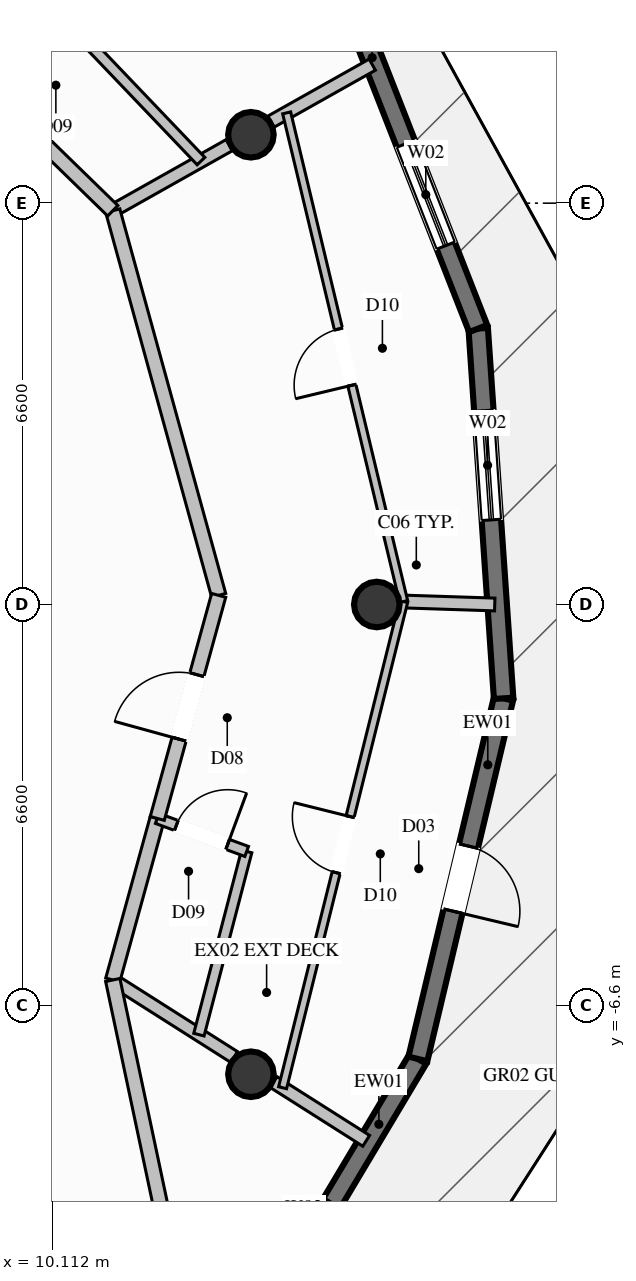
"""IFC4 building model, lengths in metres.
Left out: names, types, materials, properties, quantities, classifications, styles, units other than length and angle.
Written with IfcOpenShell. Run it as: python <this file> out.ifc"""

import sys

from ifc_helpers import new_model, si_unit, direction, frame, frame_2d, origin, origin_2d, place, context, subcontext, project, spatial, rectangle, circle, extrude, element, fill, save


model = new_model("IFC4")
c1 = context("Model", 3, precision=1e-05, world=origin(), true_north=direction((0.0, 1.0)))
c2 = subcontext(c1, "Body", "Model", "MODEL_VIEW")
j1 = project(units=[si_unit("LENGTHUNIT", "METRE"), si_unit("PLANEANGLEUNIT", "RADIAN")], contexts=[c1])
p1 = place(None, origin())
s1 = spatial("IfcSite", under=j1, at=p1, CompositionType="ELEMENT")
p2 = place(p1, origin())
s2 = spatial("IfcBuilding", under=s1, at=p2, CompositionType="ELEMENT")
p3 = place(p2, frame((0.0, 0.0, 293.4)))
s3 = spatial("IfcBuildingStorey", under=s2, at=p3, CompositionType="ELEMENT", Elevation=293.4)
for number, where, z_axis, x_axis in (
    (1, (15.45, 0.0, 0.0), (0.0, 0.0, 1.0), (1.0, 0.0, 0.0)),
    (2, (13.38, 7.725, 0.0), (0.0, 0.0, 1.0), (1.0, 0.0, 0.0)),
    (3, (13.38, -7.725, 0.0), (0.0, 0.0, 1.0), (1.0, 0.0, 0.0)),
):
    element("IfcColumn", number, at=place(p3, frame(where, z_axis=z_axis, x_axis=x_axis)), inside=s3, PredefinedType="COLUMN", context=c2, shape_type="SweptSolid", body=[
        extrude(circle(Radius=0.375, at=origin_2d()), origin(), (0.0, 0.0, 1.0), 3.8),
    ])
p4 = place(p3, frame((16.126, -7.473, 0.0), z_axis=(0.0, 0.0, 1.0), x_axis=(-0.512459907896, -0.858711152134, 0.0)))
e4 = element("IfcWall", 4, at=p4, inside=s3, PredefinedType="SOLIDWALL", context=c2, shape_type="SweptSolid", body=[
    extrude(rectangle(XDim=6.053, YDim=0.32, at=frame_2d((3.027, 0.0))), origin(), (0.0, 0.0, 1.0), 3.57),
])
p5 = place(p4, frame((2.754, 0.0, 0.35)))
e5 = element("IfcOpeningElement", 5, at=p5, cuts=e4, PredefinedType="OPENING", context=c2, shape_type="SweptSolid", body=[
    extrude(rectangle(XDim=1.8, YDim=2.6, at=frame_2d((0.9, 1.3))), frame((0.0, 0.17, 0.0), z_axis=(0.0, -1.0, 0.0), x_axis=(1.0, 0.0, 0.0)), (0.0, 0.0, 1.0), 0.34),
])
p6 = place(p3, frame((17.536, -1.543, 0.0), z_axis=(0.0, 0.0, 1.0), x_axis=(-0.23131366192, -0.972879226733, 0.0)))
e6 = element("IfcWall", 6, at=p6, inside=s3, PredefinedType="SOLIDWALL", context=c2, shape_type="SweptSolid", body=[
    extrude(rectangle(XDim=6.095, YDim=0.32, at=frame_2d((3.048, 0.0))), origin(), (0.0, 0.0, 1.0), 3.57),
])
p7 = place(p6, frame((2.498, 0.0, 0.0)))
e7 = element("IfcOpeningElement", 7, at=p7, cuts=e6, PredefinedType="OPENING", context=c2, shape_type="SweptSolid", body=[
    extrude(rectangle(XDim=1.1, YDim=2.2, at=frame_2d((0.55, 1.1))), frame((0.0, 0.17, 0.0), z_axis=(0.0, -1.0, 0.0), x_axis=(1.0, 0.0, 0.0)), (0.0, 0.0, 1.0), 0.34),
])
p8 = place(p3, frame((17.118, 4.538, 0.0), z_axis=(0.0, 0.0, 1.0), x_axis=(0.068571155559, -0.997646228192, 0.0)))
e8 = element("IfcWall", 8, at=p8, inside=s3, PredefinedType="SOLIDWALL", context=c2, shape_type="SweptSolid", body=[
    extrude(rectangle(XDim=6.095, YDim=0.32, at=frame_2d((3.048, 0.0))), origin(), (0.0, 0.0, 1.0), 3.57),
])
p9 = place(p8, frame((1.354, 0.0, 0.35)))
e9 = element("IfcOpeningElement", 9, at=p9, cuts=e8, PredefinedType="OPENING", context=c2, shape_type="SweptSolid", body=[
    extrude(rectangle(XDim=1.8, YDim=2.6, at=frame_2d((0.9, 1.3))), frame((0.0, 0.17, 0.0), z_axis=(0.0, -1.0, 0.0), x_axis=(1.0, 0.0, 0.0)), (0.0, 0.0, 1.0), 0.34),
])
p10 = place(p3, frame((14.911, 10.175, 0.0), z_axis=(0.0, 0.0, 1.0), x_axis=(0.364580296342, -0.931171953787, 0.0)))
e10 = element("IfcWall", 10, at=p10, inside=s3, PredefinedType="SOLIDWALL", context=c2, shape_type="SweptSolid", body=[
    extrude(rectangle(XDim=6.054, YDim=0.32, at=frame_2d((3.027, 0.0))), origin(), (0.0, 0.0, 1.0), 3.57),
])
p11 = place(p10, frame((2.789, 0.0, 0.35)))
e11 = element("IfcOpeningElement", 11, at=p11, cuts=e10, PredefinedType="OPENING", context=c2, shape_type="SweptSolid", body=[
    extrude(rectangle(XDim=1.8, YDim=2.6, at=frame_2d((0.9, 1.3))), frame((0.0, 0.17, 0.0), z_axis=(0.0, -1.0, 0.0), x_axis=(1.0, 0.0, 0.0)), (0.0, 0.0, 1.0), 0.34),
])
p12 = place(p3, frame((11.108, 6.475, 0.0), z_axis=(0.0, 0.0, 1.0), x_axis=(0.87136196096, 0.490640737192, 0.0)))
e12 = element("IfcWall", 12, at=p12, inside=s3, PredefinedType="PARTITIONING", context=c2, shape_type="SweptSolid", body=[
    extrude(rectangle(XDim=2.199, YDim=0.21, at=frame_2d((1.1, 0.0))), origin(), (0.0, 0.0, 1.0), 3.011),
])
p13 = place(p3, frame((13.711, 7.941, 0.0), z_axis=(0.0, 0.0, 1.0), x_axis=(0.871479967714, 0.490431102065, 0.0)))
e13 = element("IfcWall", 13, at=p13, inside=s3, PredefinedType="PARTITIONING", context=c2, shape_type="SweptSolid", body=[
    extrude(rectangle(XDim=1.911, YDim=0.21, at=frame_2d((0.955, 0.0))), origin(), (0.0, 0.0, 1.0), 3.57),
])
p14 = place(p3, frame((11.108, -6.175, 0.0), z_axis=(0.0, 0.0, 1.0), x_axis=(0.84431145075, -0.535852754152, 0.0)))
e14 = element("IfcWall", 14, at=p14, inside=s3, PredefinedType="PARTITIONING", context=c2, shape_type="SweptSolid", body=[
    extrude(rectangle(XDim=2.364, YDim=0.21, at=frame_2d((1.182, 0.0))), origin(), (0.0, 0.0, 1.0), 3.011),
])
p15 = place(p3, frame((13.753, -7.854, 0.0), z_axis=(0.0, 0.0, 1.0), x_axis=(0.844435400929, -0.535657403251, 0.0)))
e15 = element("IfcWall", 15, at=p15, inside=s3, PredefinedType="PARTITIONING", context=c2, shape_type="SweptSolid", body=[
    extrude(rectangle(XDim=1.803, YDim=0.21, at=frame_2d((0.902, 0.0))), origin(), (0.0, 0.0, 1.0), 3.57),
])
p16 = place(p3, frame((11.108, -6.175, 0.0), z_axis=(0.0, 0.0, 1.0), x_axis=(0.265664996475, 0.964065407349, 0.0)))
e16 = element("IfcWall", 16, at=p16, inside=s3, PredefinedType="PARTITIONING", context=c2, shape_type="SweptSolid", body=[
    extrude(rectangle(XDim=2.756, YDim=0.24, at=frame_2d((1.378, 0.0))), origin(), (0.0, 0.0, 1.0), 3.57),
])
p17 = place(p3, frame((12.525, -7.074, 0.0), z_axis=(0.0, 0.0, 1.0), x_axis=(0.252172913421, 0.967682190462, 0.0)))
e17 = element("IfcWall", 17, at=p17, inside=s3, PredefinedType="PLUMBINGWALL", context=c2, shape_type="SweptSolid", body=[
    extrude(rectangle(XDim=3.114, YDim=0.175, at=frame_2d((1.557, 0.0))), origin(), (0.0, 0.0, 1.0), 3.57),
])
p18 = place(p3, frame((11.84, -3.518, 0.0), z_axis=(0.0, 0.0, 1.0), x_axis=(0.93805285267, -0.346492201352, 0.0)))
e18 = element("IfcWall", 18, at=p18, inside=s3, PredefinedType="PLUMBINGWALL", context=c2, shape_type="SweptSolid", body=[
    extrude(rectangle(XDim=1.567, YDim=0.175, at=frame_2d((0.784, 0.0))), origin(), (0.0, 0.0, 1.0), 3.57),
])
p19 = place(p18, frame((0.334, 0.0, 0.0)))
e19 = element("IfcOpeningElement", 19, at=p19, cuts=e18, PredefinedType="OPENING", context=c2, shape_type="SweptSolid", body=[
    extrude(rectangle(XDim=0.9, YDim=2.1, at=frame_2d((0.45, 1.05))), frame((0.0, 0.098, 0.0), z_axis=(0.0, -1.0, 0.0), x_axis=(1.0, 0.0, 0.0)), (0.0, 0.0, 1.0), 0.195),
])
p20 = place(p3, frame((15.892, 0.049, 0.0), z_axis=(0.0, 0.0, 1.0), x_axis=(0.99946372997, -0.032745266459, 0.0)))
e20 = element("IfcWall", 20, at=p20, inside=s3, PredefinedType="PARTITIONING", context=c2, shape_type="SweptSolid", body=[
    extrude(rectangle(XDim=1.499, YDim=0.21, at=frame_2d((0.749, 0.0))), origin(), (0.0, 0.0, 1.0), 3.57),
])
p21 = place(p3, frame((12.85, 0.15, 0.0), z_axis=(0.0, 0.0, 1.0), x_axis=(-0.265547396414, 0.964097806375, 0.0)))
e21 = element("IfcWall", 21, at=p21, inside=s3, PredefinedType="PARTITIONING", context=c2, shape_type="SweptSolid", body=[
    extrude(rectangle(XDim=6.561, YDim=0.24, at=frame_2d((3.28, 0.0))), origin(), (0.0, 0.0, 1.0), 3.57),
])
p22 = place(p3, frame((11.84, -3.518, 0.0), z_axis=(0.0, 0.0, 1.0), x_axis=(0.265478632156, 0.9641167439, 0.0)))
e22 = element("IfcWall", 22, at=p22, inside=s3, PredefinedType="PARTITIONING", context=c2, shape_type="SweptSolid", body=[
    extrude(rectangle(XDim=3.804, YDim=0.24, at=frame_2d((1.902, 0.0))), origin(), (0.0, 0.0, 1.0), 3.57),
])
p23 = place(p22, frame((1.352, 0.0, 0.0)))
e23 = element("IfcOpeningElement", 23, at=p23, cuts=e22, PredefinedType="OPENING", context=c2, shape_type="SweptSolid", body=[
    extrude(rectangle(XDim=1.1, YDim=2.3, at=frame_2d((0.55, 1.15))), frame((0.0, 0.13, 0.0), z_axis=(0.0, -1.0, 0.0), x_axis=(1.0, 0.0, 0.0)), (0.0, 0.0, 1.0), 0.26),
])
p24 = place(p3, frame((13.901, -7.947, 0.0), z_axis=(0.0, 0.0, 1.0), x_axis=(0.241643206993, 0.970365168642, 0.0)))
e24 = element("IfcWall", 24, at=p24, inside=s3, PredefinedType="PARTITIONING", context=c2, shape_type="SweptSolid", body=[
    extrude(rectangle(XDim=8.24, YDim=0.135, at=frame_2d((4.12, 0.0))), origin(), (0.0, 0.0, 1.0), 3.138),
])
p25 = place(p24, frame((3.645, 0.0, 0.0)))
e25 = element("IfcOpeningElement", 25, at=p25, cuts=e24, PredefinedType="OPENING", context=c2, shape_type="SweptSolid", body=[
    extrude(rectangle(XDim=0.95, YDim=2.1, at=frame_2d((0.475, 1.05))), frame((0.0, 0.078, 0.0), z_axis=(0.0, -1.0, 0.0), x_axis=(1.0, 0.0, 0.0)), (0.0, 0.0, 1.0), 0.155),
])
p26 = place(p3, frame((15.892, 0.049, 0.0), z_axis=(0.0, 0.0, 1.0), x_axis=(-0.232853291141, 0.972511873863, 0.0)))
e26 = element("IfcWall", 26, at=p26, inside=s3, PredefinedType="PARTITIONING", context=c2, shape_type="SweptSolid", body=[
    extrude(rectangle(XDim=8.263, YDim=0.135, at=frame_2d((4.131, 0.0))), origin(), (0.0, 0.0, 1.0), 3.138),
])
p27 = place(p26, frame((3.657, 0.0, 0.0)))
e27 = element("IfcOpeningElement", 27, at=p27, cuts=e26, PredefinedType="OPENING", context=c2, shape_type="SweptSolid", body=[
    extrude(rectangle(XDim=0.95, YDim=2.1, at=frame_2d((0.475, 1.05))), frame((0.0, 0.078, 0.0), z_axis=(0.0, -1.0, 0.0), x_axis=(1.0, 0.0, 0.0)), (0.0, 0.0, 1.0), 0.155),
])
p28 = place(p3, frame((11.108, 6.475, 0.0), z_axis=(0.0, 0.0, 1.0), x_axis=(-0.716543745136, 0.697542157369, 0.0)))
e28 = element("IfcWall", 28, at=p28, inside=s3, PredefinedType="PARTITIONING", context=c2, shape_type="SweptSolid", body=[
    extrude(rectangle(XDim=2.788, YDim=0.24, at=frame_2d((1.394, 0.0))), origin(), (0.0, 0.0, 1.0), 3.57),
])
p29 = place(p3, frame((12.559, 7.292, 0.0), z_axis=(0.0, 0.0, 1.0), x_axis=(-0.690718610585, 0.723123641566, 0.0)))
e29 = element("IfcWall", 29, at=p29, inside=s3, PredefinedType="PLUMBINGWALL", context=c2, shape_type="SweptSolid", body=[
    extrude(rectangle(XDim=3.179, YDim=0.175, at=frame_2d((1.59, 0.0))), origin(), (0.0, 0.0, 1.0), 3.57),
])
p30 = place(p3, frame((9.11, 8.42, 0.0), z_axis=(0.0, 0.0, 1.0), x_axis=(0.730548551993, 0.682860756803, 0.0)))
e30 = element("IfcWall", 30, at=p30, inside=s3, PredefinedType="PLUMBINGWALL", context=c2, shape_type="SweptSolid", body=[
    extrude(rectangle(XDim=1.715, YDim=0.175, at=frame_2d((0.857, 0.0))), origin(), (0.0, 0.0, 1.0), 3.57),
])
p31 = place(p30, frame((0.408, 0.0, 0.0)))
e31 = element("IfcOpeningElement", 31, at=p31, cuts=e30, PredefinedType="OPENING", context=c2, shape_type="SweptSolid", body=[
    extrude(rectangle(XDim=0.9, YDim=2.1, at=frame_2d((0.45, 1.05))), frame((0.0, 0.098, 0.0), z_axis=(0.0, -1.0, 0.0), x_axis=(1.0, 0.0, 0.0)), (0.0, 0.0, 1.0), 0.195),
])
p32 = place(p3, frame((12.3, -11.8, 0.0), z_axis=(0.0, 0.0, 1.0), x_axis=(-0.207330597994, 0.978270935445, 0.0)))
e32 = element("IfcWall", 32, at=p32, inside=s3, PredefinedType="PARTITIONING", context=c2, shape_type="SweptSolid", body=[
    extrude(rectangle(XDim=5.75, YDim=0.24, at=frame_2d((2.875, 0.0))), origin(), (0.0, 0.0, 1.0), 3.57),
])
p33 = place(p7, origin())
e33 = element("IfcDoor", 33, at=p33, inside=s3, OperationType="SINGLE_SWING_RIGHT", PredefinedType="DOOR", context=c2, shape_type="SweptSolid", body=[
    extrude(rectangle(XDim=1.1, YDim=2.2, at=frame_2d((0.55, 1.1))), frame((0.0, 0.025, 0.0), z_axis=(0.0, -1.0, 0.0), x_axis=(1.0, 0.0, 0.0)), (0.0, 0.0, 1.0), 0.05),
])
fill(e7, e33)
p34 = place(p9, origin())
e34 = element("IfcWindow", 34, at=p34, inside=s3, PartitioningType="SINGLE_PANEL", PredefinedType="WINDOW", context=c2, shape_type="SweptSolid", body=[
    extrude(rectangle(XDim=1.8, YDim=2.6, at=frame_2d((0.9, 1.3))), frame((0.0, 0.03, 0.0), z_axis=(0.0, -1.0, 0.0), x_axis=(1.0, 0.0, 0.0)), (0.0, 0.0, 1.0), 0.06),
])
fill(e9, e34)
p35 = place(p11, origin())
e35 = element("IfcWindow", 35, at=p35, inside=s3, PartitioningType="SINGLE_PANEL", PredefinedType="WINDOW", context=c2, shape_type="SweptSolid", body=[
    extrude(rectangle(XDim=1.8, YDim=2.6, at=frame_2d((0.9, 1.3))), frame((0.0, 0.03, 0.0), z_axis=(0.0, -1.0, 0.0), x_axis=(1.0, 0.0, 0.0)), (0.0, 0.0, 1.0), 0.06),
])
fill(e11, e35)
p36 = place(p19, origin())
e36 = element("IfcDoor", 36, at=p36, inside=s3, OperationType="SINGLE_SWING_RIGHT", PredefinedType="DOOR", context=c2, shape_type="SweptSolid", body=[
    extrude(rectangle(XDim=0.9, YDim=2.1, at=frame_2d((0.45, 1.05))), frame((0.0, 0.025, 0.0), z_axis=(0.0, -1.0, 0.0), x_axis=(1.0, 0.0, 0.0)), (0.0, 0.0, 1.0), 0.05),
])
fill(e19, e36)
p37 = place(p23, origin())
e37 = element("IfcDoor", 37, at=p37, inside=s3, OperationType="SINGLE_SWING_LEFT", PredefinedType="DOOR", context=c2, shape_type="SweptSolid", body=[
    extrude(rectangle(XDim=1.1, YDim=2.3, at=frame_2d((0.55, 1.15))), frame((0.0, 0.025, 0.0), z_axis=(0.0, -1.0, 0.0), x_axis=(1.0, 0.0, 0.0)), (0.0, 0.0, 1.0), 0.05),
])
fill(e23, e37)
p38 = place(p25, origin())
e38 = element("IfcDoor", 38, at=p38, inside=s3, OperationType="SINGLE_SWING_RIGHT", PredefinedType="DOOR", context=c2, shape_type="SweptSolid", body=[
    extrude(rectangle(XDim=0.95, YDim=2.1, at=frame_2d((0.475, 1.05))), frame((0.0, 0.025, 0.0), z_axis=(0.0, -1.0, 0.0), x_axis=(1.0, 0.0, 0.0)), (0.0, 0.0, 1.0), 0.05),
])
fill(e25, e38)
p39 = place(p27, origin())
e39 = element("IfcDoor", 39, at=p39, inside=s3, OperationType="SINGLE_SWING_LEFT", PredefinedType="DOOR", context=c2, shape_type="SweptSolid", body=[
    extrude(rectangle(XDim=0.95, YDim=2.1, at=frame_2d((0.475, 1.05))), frame((0.0, 0.025, 0.0), z_axis=(0.0, -1.0, 0.0), x_axis=(1.0, 0.0, 0.0)), (0.0, 0.0, 1.0), 0.05),
])
fill(e27, e39)
save(model, sys.argv[1])
